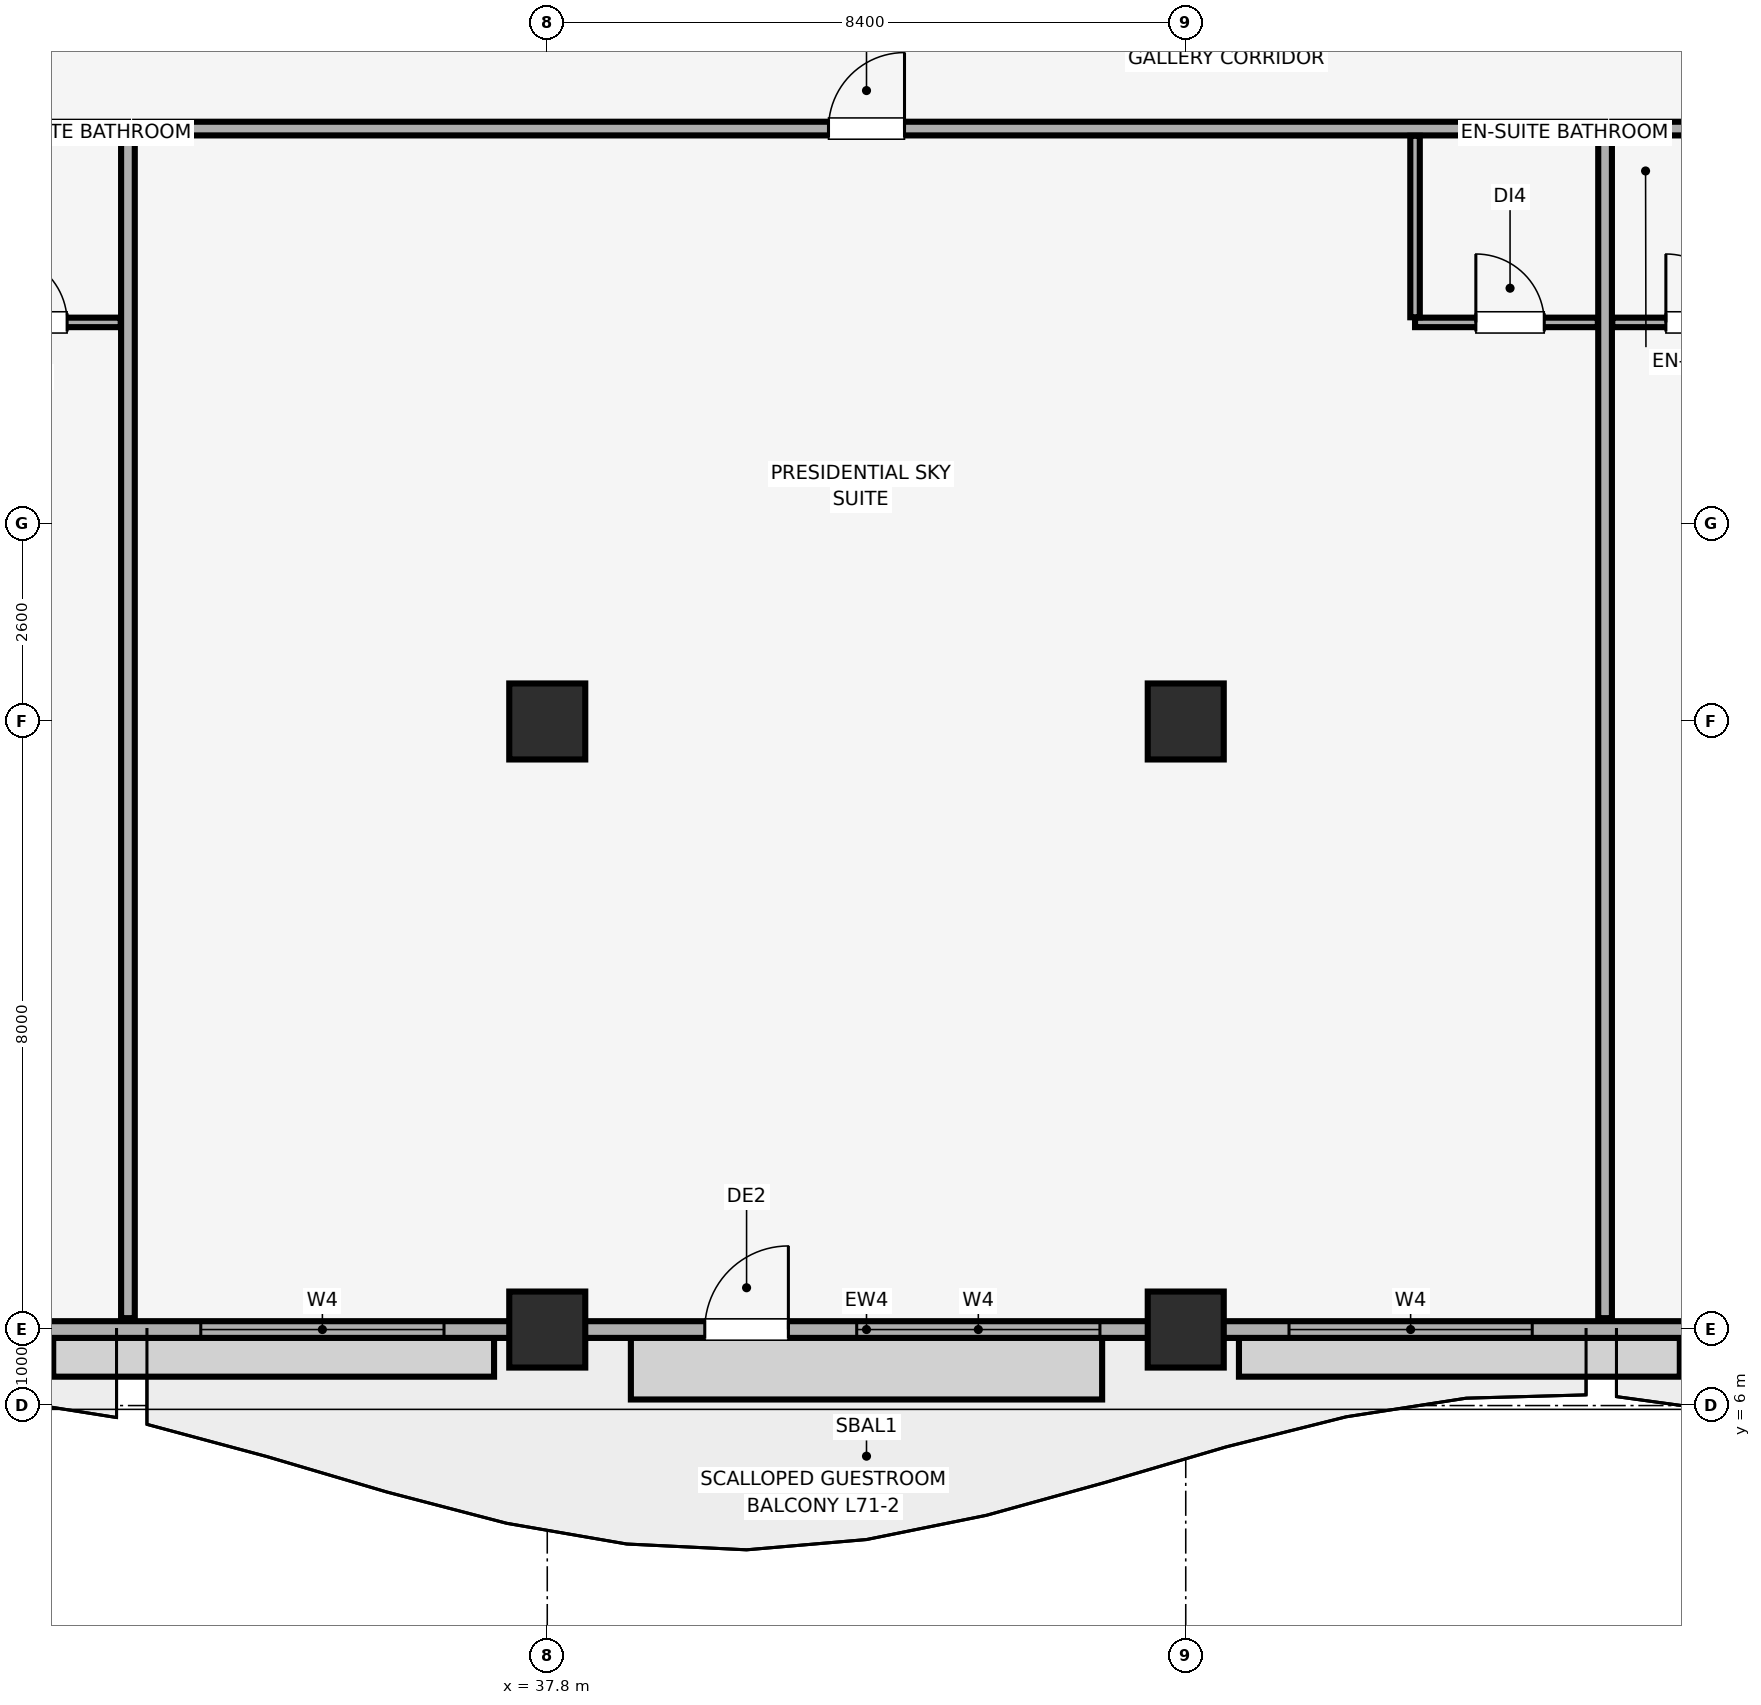
"""IFC4 building model, lengths in metres.
Left out: names, types, materials, properties, quantities, classifications, styles, units other than length and angle.
Written with IfcOpenShell. Run it as: python <this file> out.ifc"""

import sys

from ifc_helpers import new_model, si_unit, direction, frame, frame_2d, origin, origin_2d, place, context, subcontext, project, spatial, rectangle, extrude, element, fill, save


model = new_model("IFC4")
c1 = context("Model", 3, precision=1e-05, world=origin(), true_north=direction((0.0, 1.0)))
c2 = subcontext(c1, "Body", "Model", "MODEL_VIEW")
j1 = project(units=[si_unit("LENGTHUNIT", "METRE"), si_unit("PLANEANGLEUNIT", "RADIAN")], contexts=[c1])
p1 = place(None, origin())
s1 = spatial("IfcSite", under=j1, at=p1, CompositionType="ELEMENT")
p2 = place(p1, origin())
s2 = spatial("IfcBuilding", under=s1, at=p2, CompositionType="ELEMENT")
p3 = place(p2, frame((0.0, 0.0, 290.3)))
s3 = spatial("IfcBuildingStorey", under=s2, at=p3, CompositionType="ELEMENT", Elevation=290.3)
for number, where, z_axis, x_axis in (
    (1, (37.8, 7.0, 0.0), (0.0, 0.0, 1.0), (1.0, 0.0, 0.0)),
    (2, (46.2, 7.0, 0.0), (0.0, 0.0, 1.0), (1.0, 0.0, 0.0)),
    (3, (37.8, 15.0, 0.0), (0.0, 0.0, 1.0), (1.0, 0.0, 0.0)),
    (4, (46.2, 15.0, 0.0), (0.0, 0.0, 1.0), (1.0, 0.0, 0.0)),
):
    element("IfcColumn", number, at=place(p3, frame(where, z_axis=z_axis, x_axis=x_axis)), inside=s3, PredefinedType="COLUMN", context=c2, shape_type="SweptSolid", body=[
        extrude(rectangle(XDim=1.0, YDim=1.0, at=origin_2d()), origin(), (0.0, 0.0, 1.0), 4.02),
    ])
p4 = place(p3, frame((12.6, 7.0, 0.0), z_axis=(0.0, 0.0, 1.0), x_axis=(1.0, 0.0, 0.0)))
e5 = element("IfcWall", 5, at=p4, inside=s3, PredefinedType="SOLIDWALL", context=c2, shape_type="SweptSolid", body=[
    extrude(rectangle(XDim=58.8, YDim=0.22, at=frame_2d((29.4, 0.0))), origin(), (0.0, 0.0, 1.0), 3.22),
])
p5 = place(p4, frame((8.317, 0.0, 0.0)))
e6 = element("IfcOpeningElement", 6, at=p5, cuts=e5, PredefinedType="OPENING", context=c2, shape_type="SweptSolid", body=[
    extrude(rectangle(XDim=1.1, YDim=2.15, at=frame_2d((0.55, 1.075))), frame((0.0, 0.12, 0.0), z_axis=(0.0, -1.0, 0.0), x_axis=(1.0, 0.0, 0.0)), (0.0, 0.0, 1.0), 0.24),
])
p6 = place(p4, frame((27.272, 0.0, 0.0)))
e7 = element("IfcOpeningElement", 7, at=p6, cuts=e5, PredefinedType="OPENING", context=c2, shape_type="SweptSolid", body=[
    extrude(rectangle(XDim=1.1, YDim=2.15, at=frame_2d((0.55, 1.075))), frame((0.0, 0.12, 0.0), z_axis=(0.0, -1.0, 0.0), x_axis=(1.0, 0.0, 0.0)), (0.0, 0.0, 1.0), 0.24),
])
p7 = place(p4, frame((49.383, 0.0, 0.0)))
e8 = element("IfcOpeningElement", 8, at=p7, cuts=e5, PredefinedType="OPENING", context=c2, shape_type="SweptSolid", body=[
    extrude(rectangle(XDim=1.1, YDim=2.15, at=frame_2d((0.55, 1.075))), frame((0.0, 0.12, 0.0), z_axis=(0.0, -1.0, 0.0), x_axis=(1.0, 0.0, 0.0)), (0.0, 0.0, 1.0), 0.24),
])
p8 = place(p4, frame((0.885, 0.0, 0.85)))
e9 = element("IfcOpeningElement", 9, at=p8, cuts=e5, PredefinedType="OPENING", context=c2, shape_type="SweptSolid", body=[
    extrude(rectangle(XDim=1.5, YDim=1.4, at=frame_2d((0.75, 0.7))), frame((0.0, 0.12, 0.0), z_axis=(0.0, -1.0, 0.0), x_axis=(1.0, 0.0, 0.0)), (0.0, 0.0, 1.0), 0.24),
])
p9 = place(p4, frame((4.473, 0.0, 0.85)))
e10 = element("IfcOpeningElement", 10, at=p9, cuts=e5, PredefinedType="OPENING", context=c2, shape_type="SweptSolid", body=[
    extrude(rectangle(XDim=3.2, YDim=1.85, at=frame_2d((1.6, 0.925))), frame((0.0, 0.12, 0.0), z_axis=(0.0, -1.0, 0.0), x_axis=(1.0, 0.0, 0.0)), (0.0, 0.0, 1.0), 0.24),
])
p10 = place(p4, frame((12.8, 0.0, 0.85)))
e11 = element("IfcOpeningElement", 11, at=p10, cuts=e5, PredefinedType="OPENING", context=c2, shape_type="SweptSolid", body=[
    extrude(rectangle(XDim=3.2, YDim=1.85, at=frame_2d((1.6, 0.925))), frame((0.0, 0.12, 0.0), z_axis=(0.0, -1.0, 0.0), x_axis=(1.0, 0.0, 0.0)), (0.0, 0.0, 1.0), 0.24),
])
p11 = place(p4, frame((20.642, 0.0, 0.85)))
e12 = element("IfcOpeningElement", 12, at=p11, cuts=e5, PredefinedType="OPENING", context=c2, shape_type="SweptSolid", body=[
    extrude(rectangle(XDim=3.2, YDim=1.85, at=frame_2d((1.6, 0.925))), frame((0.0, 0.12, 0.0), z_axis=(0.0, -1.0, 0.0), x_axis=(1.0, 0.0, 0.0)), (0.0, 0.0, 1.0), 0.24),
])
p12 = place(p4, frame((29.271, 0.0, 0.85)))
e13 = element("IfcOpeningElement", 13, at=p12, cuts=e5, PredefinedType="OPENING", context=c2, shape_type="SweptSolid", body=[
    extrude(rectangle(XDim=3.2, YDim=1.85, at=frame_2d((1.6, 0.925))), frame((0.0, 0.12, 0.0), z_axis=(0.0, -1.0, 0.0), x_axis=(1.0, 0.0, 0.0)), (0.0, 0.0, 1.0), 0.24),
])
p13 = place(p4, frame((34.958, 0.0, 0.85)))
e14 = element("IfcOpeningElement", 14, at=p13, cuts=e5, PredefinedType="OPENING", context=c2, shape_type="SweptSolid", body=[
    extrude(rectangle(XDim=3.2, YDim=1.85, at=frame_2d((1.6, 0.925))), frame((0.0, 0.12, 0.0), z_axis=(0.0, -1.0, 0.0), x_axis=(1.0, 0.0, 0.0)), (0.0, 0.0, 1.0), 0.24),
])
p14 = place(p4, frame((42.8, 0.0, 0.85)))
e15 = element("IfcOpeningElement", 15, at=p14, cuts=e5, PredefinedType="OPENING", context=c2, shape_type="SweptSolid", body=[
    extrude(rectangle(XDim=3.2, YDim=1.85, at=frame_2d((1.6, 0.925))), frame((0.0, 0.12, 0.0), z_axis=(0.0, -1.0, 0.0), x_axis=(1.0, 0.0, 0.0)), (0.0, 0.0, 1.0), 0.24),
])
p15 = place(p4, frame((51.127, 0.0, 0.85)))
e16 = element("IfcOpeningElement", 16, at=p15, cuts=e5, PredefinedType="OPENING", context=c2, shape_type="SweptSolid", body=[
    extrude(rectangle(XDim=3.2, YDim=1.85, at=frame_2d((1.6, 0.925))), frame((0.0, 0.12, 0.0), z_axis=(0.0, -1.0, 0.0), x_axis=(1.0, 0.0, 0.0)), (0.0, 0.0, 1.0), 0.24),
])
p16 = place(p4, frame((56.415, 0.0, 0.85)))
e17 = element("IfcOpeningElement", 17, at=p16, cuts=e5, PredefinedType="OPENING", context=c2, shape_type="SweptSolid", body=[
    extrude(rectangle(XDim=1.5, YDim=1.4, at=frame_2d((0.75, 0.7))), frame((0.0, 0.12, 0.0), z_axis=(0.0, -1.0, 0.0), x_axis=(1.0, 0.0, 0.0)), (0.0, 0.0, 1.0), 0.24),
])
p17 = place(p3, frame((9.15, 22.8, 0.0), z_axis=(0.0, 0.0, 1.0), x_axis=(1.0, 0.0, 0.0)))
e18 = element("IfcWall", 18, at=p17, inside=s3, PredefinedType="PARTITIONING", context=c2, shape_type="SweptSolid", body=[
    extrude(rectangle(XDim=23.133, YDim=0.18, at=frame_2d((11.567, 0.0))), origin(), (0.0, 0.0, 1.0), 4.02),
])
p18 = place(p17, frame((10.15, 0.0, 0.0)))
e19 = element("IfcOpeningElement", 19, at=p18, cuts=e18, PredefinedType="OPENING", context=c2, shape_type="SweptSolid", body=[
    extrude(rectangle(XDim=1.0, YDim=2.15, at=frame_2d((0.5, 1.075))), frame((0.0, 0.1, 0.0), z_axis=(0.0, -1.0, 0.0), x_axis=(1.0, 0.0, 0.0)), (0.0, 0.0, 1.0), 0.2),
])
p19 = place(p3, frame((32.283, 7.15, 0.0), z_axis=(0.0, 0.0, 1.0), x_axis=(0.0, 1.0, 0.0)))
e20 = element("IfcWall", 20, at=p19, inside=s3, PredefinedType="PARTITIONING", context=c2, shape_type="SweptSolid", body=[
    extrude(rectangle(XDim=15.555, YDim=0.18, at=frame_2d((7.778, 0.0))), origin(), (0.0, 0.0, 1.0), 4.02),
])
p20 = place(p3, frame((29.783, 20.25, 0.0), z_axis=(0.0, 0.0, 1.0), x_axis=(1.0, 0.0, 0.0)))
e21 = element("IfcWall", 21, at=p20, inside=s3, PredefinedType="PARTITIONING", context=c2, shape_type="SweptSolid", body=[
    extrude(rectangle(XDim=2.405, YDim=0.125, at=frame_2d((1.203, 0.0))), origin(), (0.0, 0.0, 1.0), 4.02),
])
p21 = place(p20, frame((0.8, 0.0, 0.0)))
e22 = element("IfcOpeningElement", 22, at=p21, cuts=e21, PredefinedType="OPENING", context=c2, shape_type="SweptSolid", body=[
    extrude(rectangle(XDim=0.9, YDim=2.1, at=frame_2d((0.45, 1.05))), frame((0.0, 0.073, 0.0), z_axis=(0.0, -1.0, 0.0), x_axis=(1.0, 0.0, 0.0)), (0.0, 0.0, 1.0), 0.145),
])
p22 = place(p3, frame((32.378, 22.8, 0.0), z_axis=(0.0, 0.0, 1.0), x_axis=(1.0, 0.0, 0.0)))
e23 = element("IfcWall", 23, at=p22, inside=s3, PredefinedType="PARTITIONING", context=c2, shape_type="SweptSolid", body=[
    extrude(rectangle(XDim=19.338, YDim=0.18, at=frame_2d((9.669, 0.0))), origin(), (0.0, 0.0, 1.0), 4.02),
])
p23 = place(p22, frame((9.122, 0.0, 0.0)))
e24 = element("IfcOpeningElement", 24, at=p23, cuts=e23, PredefinedType="OPENING", context=c2, shape_type="SweptSolid", body=[
    extrude(rectangle(XDim=1.0, YDim=2.15, at=frame_2d((0.5, 1.075))), frame((0.0, 0.1, 0.0), z_axis=(0.0, -1.0, 0.0), x_axis=(1.0, 0.0, 0.0)), (0.0, 0.0, 1.0), 0.2),
])
p24 = place(p3, frame((51.717, 7.15, 0.0), z_axis=(0.0, 0.0, 1.0), x_axis=(0.0, 1.0, 0.0)))
e25 = element("IfcWall", 25, at=p24, inside=s3, PredefinedType="PARTITIONING", context=c2, shape_type="SweptSolid", body=[
    extrude(rectangle(XDim=15.555, YDim=0.18, at=frame_2d((7.778, 0.0))), origin(), (0.0, 0.0, 1.0), 4.02),
])
p25 = place(p3, frame((49.217, 20.25, 0.0), z_axis=(0.0, 0.0, 1.0), x_axis=(1.0, 0.0, 0.0)))
e26 = element("IfcWall", 26, at=p25, inside=s3, PredefinedType="PARTITIONING", context=c2, shape_type="SweptSolid", body=[
    extrude(rectangle(XDim=2.405, YDim=0.125, at=frame_2d((1.202, 0.0))), origin(), (0.0, 0.0, 1.0), 4.02),
])
p26 = place(p25, frame((0.8, 0.0, 0.0)))
e27 = element("IfcOpeningElement", 27, at=p26, cuts=e26, PredefinedType="OPENING", context=c2, shape_type="SweptSolid", body=[
    extrude(rectangle(XDim=0.9, YDim=2.1, at=frame_2d((0.45, 1.05))), frame((0.0, 0.073, 0.0), z_axis=(0.0, -1.0, 0.0), x_axis=(1.0, 0.0, 0.0)), (0.0, 0.0, 1.0), 0.145),
])
p27 = place(p3, frame((49.217, 20.317, 0.0), z_axis=(0.0, 0.0, 1.0), x_axis=(0.0, 1.0, 0.0)))
e28 = element("IfcWall", 28, at=p27, inside=s3, PredefinedType="PARTITIONING", context=c2, shape_type="SweptSolid", body=[
    extrude(rectangle(XDim=2.388, YDim=0.125, at=frame_2d((1.194, 0.0))), origin(), (0.0, 0.0, 1.0), 4.02),
])
p28 = place(p3, frame((51.812, 22.8, 0.0), z_axis=(0.0, 0.0, 1.0), x_axis=(1.0, 0.0, 0.0)))
e29 = element("IfcWall", 29, at=p28, inside=s3, PredefinedType="PARTITIONING", context=c2, shape_type="SweptSolid", body=[
    extrude(rectangle(XDim=23.038, YDim=0.18, at=frame_2d((11.519, 0.0))), origin(), (0.0, 0.0, 1.0), 4.02),
])
p29 = place(p28, frame((11.888, 0.0, 0.0)))
e30 = element("IfcOpeningElement", 30, at=p29, cuts=e29, PredefinedType="OPENING", context=c2, shape_type="SweptSolid", body=[
    extrude(rectangle(XDim=1.0, YDim=2.15, at=frame_2d((0.5, 1.075))), frame((0.0, 0.1, 0.0), z_axis=(0.0, -1.0, 0.0), x_axis=(1.0, 0.0, 0.0)), (0.0, 0.0, 1.0), 0.2),
])
p30 = place(p3, frame((51.812, 20.25, 0.0), z_axis=(0.0, 0.0, 1.0), x_axis=(1.0, 0.0, 0.0)))
e31 = element("IfcWall", 31, at=p30, inside=s3, PredefinedType="PARTITIONING", context=c2, shape_type="SweptSolid", body=[
    extrude(rectangle(XDim=2.405, YDim=0.125, at=frame_2d((1.203, 0.0))), origin(), (0.0, 0.0, 1.0), 4.02),
])
p31 = place(p30, frame((0.705, 0.0, 0.0)))
e32 = element("IfcOpeningElement", 32, at=p31, cuts=e31, PredefinedType="OPENING", context=c2, shape_type="SweptSolid", body=[
    extrude(rectangle(XDim=0.9, YDim=2.1, at=frame_2d((0.45, 1.05))), frame((0.0, 0.073, 0.0), z_axis=(0.0, -1.0, 0.0), x_axis=(1.0, 0.0, 0.0)), (0.0, 0.0, 1.0), 0.145),
])
p32 = place(p6, origin())
e33 = element("IfcDoor", 33, at=p32, inside=s3, OperationType="SINGLE_SWING_RIGHT", PredefinedType="DOOR", context=c2, shape_type="SweptSolid", body=[
    extrude(rectangle(XDim=1.1, YDim=2.15, at=frame_2d((0.55, 1.075))), frame((0.0, 0.025, 0.0), z_axis=(0.0, -1.0, 0.0), x_axis=(1.0, 0.0, 0.0)), (0.0, 0.0, 1.0), 0.05),
])
fill(e7, e33)
p33 = place(p11, origin())
e34 = element("IfcWindow", 34, at=p33, inside=s3, PartitioningType="SINGLE_PANEL", PredefinedType="WINDOW", context=c2, shape_type="SweptSolid", body=[
    extrude(rectangle(XDim=3.2, YDim=1.85, at=frame_2d((1.6, 0.925))), frame((0.0, 0.03, 0.0), z_axis=(0.0, -1.0, 0.0), x_axis=(1.0, 0.0, 0.0)), (0.0, 0.0, 1.0), 0.06),
])
fill(e12, e34)
p34 = place(p12, origin())
e35 = element("IfcWindow", 35, at=p34, inside=s3, PartitioningType="SINGLE_PANEL", PredefinedType="WINDOW", context=c2, shape_type="SweptSolid", body=[
    extrude(rectangle(XDim=3.2, YDim=1.85, at=frame_2d((1.6, 0.925))), frame((0.0, 0.03, 0.0), z_axis=(0.0, -1.0, 0.0), x_axis=(1.0, 0.0, 0.0)), (0.0, 0.0, 1.0), 0.06),
])
fill(e13, e35)
p35 = place(p13, origin())
e36 = element("IfcWindow", 36, at=p35, inside=s3, PartitioningType="SINGLE_PANEL", PredefinedType="WINDOW", context=c2, shape_type="SweptSolid", body=[
    extrude(rectangle(XDim=3.2, YDim=1.85, at=frame_2d((1.6, 0.925))), frame((0.0, 0.03, 0.0), z_axis=(0.0, -1.0, 0.0), x_axis=(1.0, 0.0, 0.0)), (0.0, 0.0, 1.0), 0.06),
])
fill(e14, e36)
p36 = place(p21, origin())
e37 = element("IfcDoor", 37, at=p36, inside=s3, OperationType="SINGLE_SWING_LEFT", PredefinedType="DOOR", context=c2, shape_type="SweptSolid", body=[
    extrude(rectangle(XDim=0.9, YDim=2.1, at=frame_2d((0.45, 1.05))), frame((0.0, 0.025, 0.0), z_axis=(0.0, -1.0, 0.0), x_axis=(1.0, 0.0, 0.0)), (0.0, 0.0, 1.0), 0.05),
])
fill(e22, e37)
p37 = place(p23, origin())
e38 = element("IfcDoor", 38, at=p37, inside=s3, OperationType="SINGLE_SWING_RIGHT", PredefinedType="DOOR", context=c2, shape_type="SweptSolid", body=[
    extrude(rectangle(XDim=1.0, YDim=2.15, at=frame_2d((0.5, 1.075))), frame((0.0, 0.025, 0.0), z_axis=(0.0, -1.0, 0.0), x_axis=(1.0, 0.0, 0.0)), (0.0, 0.0, 1.0), 0.05),
])
fill(e24, e38)
p38 = place(p26, origin())
e39 = element("IfcDoor", 39, at=p38, inside=s3, OperationType="SINGLE_SWING_LEFT", PredefinedType="DOOR", context=c2, shape_type="SweptSolid", body=[
    extrude(rectangle(XDim=0.9, YDim=2.1, at=frame_2d((0.45, 1.05))), frame((0.0, 0.025, 0.0), z_axis=(0.0, -1.0, 0.0), x_axis=(1.0, 0.0, 0.0)), (0.0, 0.0, 1.0), 0.05),
])
fill(e27, e39)
p39 = place(p31, origin())
e40 = element("IfcDoor", 40, at=p39, inside=s3, OperationType="SINGLE_SWING_LEFT", PredefinedType="DOOR", context=c2, shape_type="SweptSolid", body=[
    extrude(rectangle(XDim=0.9, YDim=2.1, at=frame_2d((0.45, 1.05))), frame((0.0, 0.025, 0.0), z_axis=(0.0, -1.0, 0.0), x_axis=(1.0, 0.0, 0.0)), (0.0, 0.0, 1.0), 0.05),
])
fill(e32, e40)
save(model, sys.argv[1])
